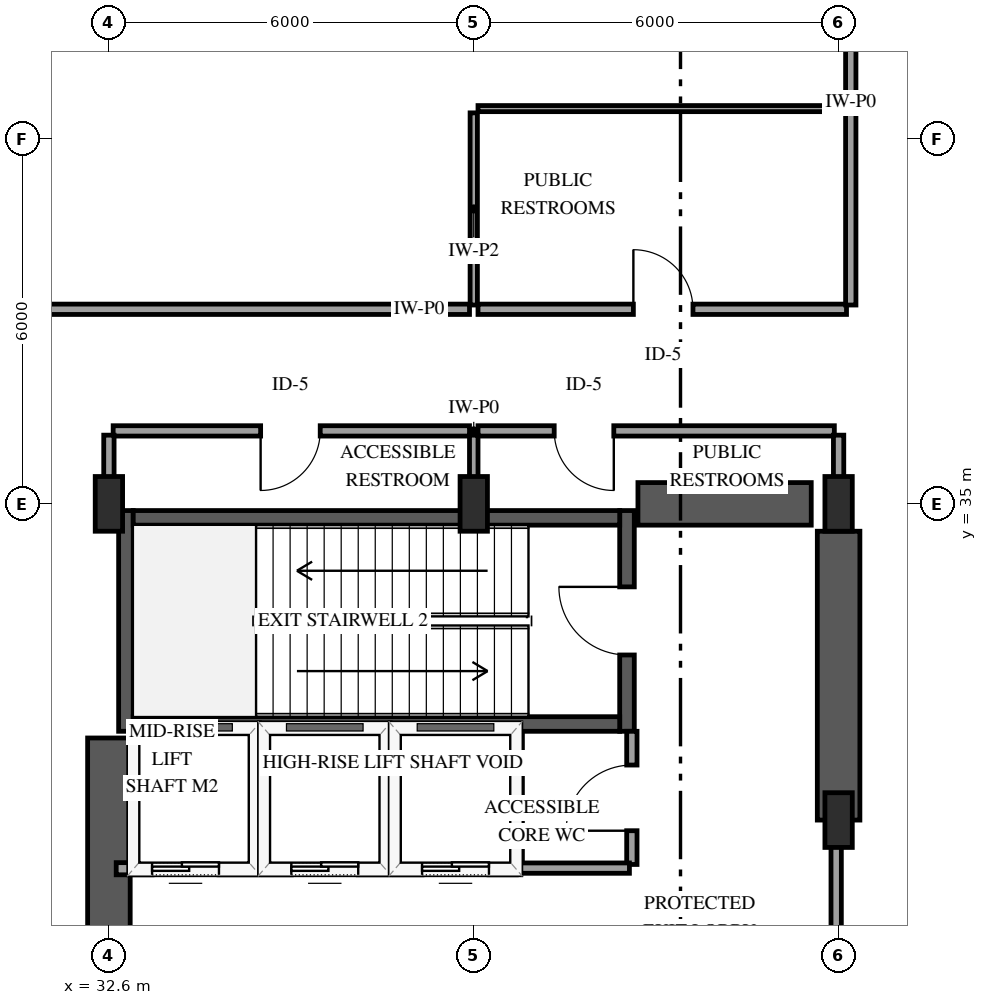
"""IFC4 building model, lengths in metres.
Left out: names, types, materials, properties, quantities, classifications, styles, units other than length and angle.
Written with IfcOpenShell. Run it as: python <this file> out.ifc"""

import sys

from ifc_helpers import new_model, si_unit, direction, frame, frame_2d, origin, origin_2d, place, context, subcontext, project, spatial, rectangle, extrude, element, fill, save


model = new_model("IFC4")
c1 = context("Model", 3, precision=1e-05, world=origin(), true_north=direction((0.0, 1.0)))
c2 = subcontext(c1, "Body", "Model", "MODEL_VIEW")
j1 = project(units=[si_unit("LENGTHUNIT", "METRE"), si_unit("PLANEANGLEUNIT", "RADIAN")], contexts=[c1])
p1 = place(None, origin())
s1 = spatial("IfcSite", under=j1, at=p1, CompositionType="ELEMENT")
p2 = place(p1, origin())
s2 = spatial("IfcBuilding", under=s1, at=p2, CompositionType="ELEMENT")
p3 = place(p2, origin())
s3 = spatial("IfcBuildingStorey", under=s2, at=p3, CompositionType="ELEMENT", Elevation=0.0)
p4 = place(p3, frame((32.88, 31.26, 0.0), z_axis=(0.0, 0.0, 1.0), x_axis=(0.0, 1.0, 0.0)))
e1 = element("IfcWall", 1, at=p4, inside=s3, PredefinedType="SHEAR", context=c2, shape_type="SweptSolid", body=[
    extrude(rectangle(XDim=3.63, YDim=0.24, at=frame_2d((1.815, 0.0))), origin(), (0.0, 0.0, 1.0), 6.0),
])
p5 = place(p3, frame((41.12, 31.26, 0.0), z_axis=(0.0, 0.0, 1.0), x_axis=(0.0, 1.0, 0.0)))
e2 = element("IfcWall", 2, at=p5, inside=s3, PredefinedType="SHEAR", context=c2, shape_type="SweptSolid", body=[
    extrude(rectangle(XDim=3.63, YDim=0.24, at=frame_2d((1.815, 0.0))), origin(), (0.0, 0.0, 1.0), 6.0),
])
p6 = place(p5, frame((1.255, 0.0, 0.0)))
e3 = element("IfcOpeningElement", 3, at=p6, cuts=e2, PredefinedType="OPENING", context=c2, shape_type="SweptSolid", body=[
    extrude(rectangle(XDim=1.12, YDim=2.15, at=frame_2d((0.56, 1.075))), frame((0.0, 0.13, 0.0), z_axis=(0.0, -1.0, 0.0), x_axis=(1.0, 0.0, 0.0)), (0.0, 0.0, 1.0), 0.26),
])
for number, where, z_axis, x_axis in (
    (4, (33.0, 31.38, 0.0), (0.0, 0.0, 1.0), (1.0, 0.0, 0.0)),
    (5, (33.0, 34.77, 0.0), (0.0, 0.0, 1.0), (1.0, 0.0, 0.0)),
):
    element("IfcWall", number, at=place(p3, frame(where, z_axis=z_axis, x_axis=x_axis)), inside=s3, PredefinedType="SHEAR", context=c2, shape_type="SweptSolid", body=[
        extrude(rectangle(XDim=8.0, YDim=0.24, at=frame_2d((4.0, 0.0))), origin(), (0.0, 0.0, 1.0), 6.0),
    ])
p7 = place(p3, frame((32.6, 18.85, 0.0), z_axis=(0.0, 0.0, 1.0), x_axis=(0.0, 1.0, 0.0)))
e6 = element("IfcWall", 6, at=p7, inside=s3, PredefinedType="SHEAR", context=c2, shape_type="SweptSolid", body=[
    extrude(rectangle(XDim=12.3, YDim=0.7, at=frame_2d((6.15, 0.0))), origin(), (0.0, 0.0, 1.0), 6.0),
])
p8 = place(p3, frame((41.3, 35.0, 0.0), z_axis=(0.0, 0.0, 1.0), x_axis=(1.0, 0.0, 0.0)))
e7 = element("IfcWall", 7, at=p8, inside=s3, PredefinedType="SHEAR", context=c2, shape_type="SweptSolid", body=[
    extrude(rectangle(XDim=2.85, YDim=0.7, at=frame_2d((1.425, 0.0))), origin(), (0.0, 0.0, 1.0), 6.0),
])
p9 = place(p3, frame((44.6, 29.8, 0.0), z_axis=(0.0, 0.0, 1.0), x_axis=(0.0, 1.0, 0.0)))
e8 = element("IfcWall", 8, at=p9, inside=s3, PredefinedType="SHEAR", context=c2, shape_type="SweptSolid", body=[
    extrude(rectangle(XDim=4.75, YDim=0.7, at=frame_2d((2.375, 0.0))), origin(), (0.0, 0.0, 1.0), 6.0),
])
for number, where, z_axis, x_axis in (
    (9, (32.6, 35.0, 0.0), (0.0, 0.0, 1.0), (1.0, 0.0, 0.0)),
    (10, (38.6, 35.0, 0.0), (0.0, 0.0, 1.0), (1.0, 0.0, 0.0)),
    (11, (44.6, 29.8, 0.0), (0.0, 0.0, 1.0), (1.0, 0.0, 0.0)),
    (12, (44.6, 35.0, 0.0), (0.0, 0.0, 1.0), (1.0, 0.0, 0.0)),
):
    element("IfcColumn", number, at=place(p3, frame(where, z_axis=z_axis, x_axis=x_axis)), inside=s3, PredefinedType="PILASTER", context=c2, shape_type="SweptSolid", body=[
        extrude(rectangle(XDim=0.45, YDim=0.9, at=origin_2d()), origin(), (0.0, 0.0, 1.0), 6.0),
    ])
p10 = place(p3, frame((32.72, 29.0, 0.0), z_axis=(0.0, 0.0, 1.0), x_axis=(1.0, 0.0, 0.0)))
e13 = element("IfcWall", 13, at=p10, inside=s3, PredefinedType="SOLIDWALL", context=c2, shape_type="SweptSolid", body=[
    extrude(rectangle(XDim=2.28, YDim=0.2, at=frame_2d((1.14, 0.0))), origin(), (0.0, 0.0, 1.0), 5.68),
])
p11 = place(p10, frame((0.59, 0.0, 0.0)))
e14 = element("IfcOpeningElement", 14, at=p11, cuts=e13, PredefinedType="OPENING", context=c2, shape_type="SweptSolid", body=[
    extrude(rectangle(XDim=1.1, YDim=2.15, at=frame_2d((0.55, 1.075))), frame((0.0, 0.11, 0.0), z_axis=(0.0, -1.0, 0.0), x_axis=(1.0, 0.0, 0.0)), (0.0, 0.0, 1.0), 0.22),
])
p12 = place(p3, frame((35.0, 29.11, 0.0), z_axis=(0.0, 0.0, 1.0), x_axis=(0.0, 1.0, 0.0)))
e15 = element("IfcWall", 15, at=p12, inside=s3, PredefinedType="SOLIDWALL", context=c2, shape_type="SweptSolid", body=[
    extrude(rectangle(XDim=2.1, YDim=0.2, at=frame_2d((1.05, 0.0))), origin(), (0.0, 0.0, 1.0), 5.68),
])
p13 = place(p3, frame((35.15, 29.0, 0.0), z_axis=(0.0, 0.0, 1.0), x_axis=(1.0, 0.0, 0.0)))
e16 = element("IfcWall", 16, at=p13, inside=s3, PredefinedType="SOLIDWALL", context=c2, shape_type="SweptSolid", body=[
    extrude(rectangle(XDim=2.0, YDim=0.2, at=frame_2d((1.0, 0.0))), origin(), (0.0, 0.0, 1.0), 5.68),
])
p14 = place(p13, frame((0.45, 0.0, 0.0)))
e17 = element("IfcOpeningElement", 17, at=p14, cuts=e16, PredefinedType="OPENING", context=c2, shape_type="SweptSolid", body=[
    extrude(rectangle(XDim=1.1, YDim=2.15, at=frame_2d((0.55, 1.075))), frame((0.0, 0.11, 0.0), z_axis=(0.0, -1.0, 0.0), x_axis=(1.0, 0.0, 0.0)), (0.0, 0.0, 1.0), 0.22),
])
p15 = place(p3, frame((37.15, 29.11, 0.0), z_axis=(0.0, 0.0, 1.0), x_axis=(0.0, 1.0, 0.0)))
e18 = element("IfcWall", 18, at=p15, inside=s3, PredefinedType="SOLIDWALL", context=c2, shape_type="SweptSolid", body=[
    extrude(rectangle(XDim=2.1, YDim=0.2, at=frame_2d((1.05, 0.0))), origin(), (0.0, 0.0, 1.0), 5.68),
])
p16 = place(p3, frame((37.3, 29.0, 0.0), z_axis=(0.0, 0.0, 1.0), x_axis=(1.0, 0.0, 0.0)))
e19 = element("IfcWall", 19, at=p16, inside=s3, PredefinedType="SOLIDWALL", context=c2, shape_type="SweptSolid", body=[
    extrude(rectangle(XDim=2.0, YDim=0.2, at=frame_2d((1.0, 0.0))), origin(), (0.0, 0.0, 1.0), 5.68),
])
p17 = place(p16, frame((0.45, 0.0, 0.0)))
e20 = element("IfcOpeningElement", 20, at=p17, cuts=e19, PredefinedType="OPENING", context=c2, shape_type="SweptSolid", body=[
    extrude(rectangle(XDim=1.1, YDim=2.15, at=frame_2d((0.55, 1.075))), frame((0.0, 0.11, 0.0), z_axis=(0.0, -1.0, 0.0), x_axis=(1.0, 0.0, 0.0)), (0.0, 0.0, 1.0), 0.22),
])
p18 = place(p3, frame((39.3, 29.11, 0.0), z_axis=(0.0, 0.0, 1.0), x_axis=(0.0, 1.0, 0.0)))
e21 = element("IfcWall", 21, at=p18, inside=s3, PredefinedType="SOLIDWALL", context=c2, shape_type="SweptSolid", body=[
    extrude(rectangle(XDim=2.1, YDim=0.2, at=frame_2d((1.05, 0.0))), origin(), (0.0, 0.0, 1.0), 5.68),
])
p19 = place(p3, frame((30.67, 38.2, 0.0), z_axis=(0.0, 0.0, 1.0), x_axis=(1.0, 0.0, 0.0)))
e22 = element("IfcWall", 22, at=p19, inside=s3, PredefinedType="PARTITIONING", context=c2, shape_type="SweptSolid", body=[
    extrude(rectangle(XDim=7.86, YDim=0.17, at=frame_2d((3.93, 0.0))), origin(), (0.0, 0.0, 1.0), 5.68),
])
p20 = place(p3, frame((44.56, 29.8, 0.0), z_axis=(0.0, 0.0, 1.0), x_axis=(0.0, -1.0, 0.0)))
e23 = element("IfcWall", 23, at=p20, inside=s3, PredefinedType="PARTITIONING", context=c2, shape_type="SweptSolid", body=[
    extrude(rectangle(XDim=6.91, YDim=0.17, at=frame_2d((3.455, 0.0))), origin(), (0.0, 0.0, 1.0), 4.72),
])
p21 = place(p20, frame((2.915, 0.0, 0.0)))
e24 = element("IfcOpeningElement", 24, at=p21, cuts=e23, PredefinedType="OPENING", context=c2, shape_type="SweptSolid", body=[
    extrude(rectangle(XDim=1.38, YDim=2.2, at=frame_2d((0.69, 1.1))), frame((0.0, 0.095, 0.0), z_axis=(0.0, -1.0, 0.0), x_axis=(1.0, 0.0, 0.0)), (0.0, 0.0, 1.0), 0.19),
])
p22 = place(p3, frame((38.67, 38.2, 0.0), z_axis=(0.0, 0.0, 1.0), x_axis=(1.0, 0.0, 0.0)))
e25 = element("IfcWall", 25, at=p22, inside=s3, PredefinedType="PARTITIONING", context=c2, shape_type="SweptSolid", body=[
    extrude(rectangle(XDim=6.06, YDim=0.17, at=frame_2d((3.03, 0.0))), origin(), (0.0, 0.0, 1.0), 5.68),
])
p23 = place(p22, frame((2.555, 0.0, 0.0)))
e26 = element("IfcOpeningElement", 26, at=p23, cuts=e25, PredefinedType="OPENING", context=c2, shape_type="SweptSolid", body=[
    extrude(rectangle(XDim=0.98, YDim=2.15, at=frame_2d((0.49, 1.075))), frame((0.0, 0.095, 0.0), z_axis=(0.0, -1.0, 0.0), x_axis=(1.0, 0.0, 0.0)), (0.0, 0.0, 1.0), 0.19),
])
p24 = place(p3, frame((44.73, 41.5, 0.0), z_axis=(0.0, 0.0, 1.0), x_axis=(-1.0, 0.0, 0.0)))
e27 = element("IfcWall", 27, at=p24, inside=s3, PredefinedType="PARTITIONING", context=c2, shape_type="SweptSolid", body=[
    extrude(rectangle(XDim=6.06, YDim=0.1, at=frame_2d((3.03, 0.0))), origin(), (0.0, 0.0, 1.0), 5.68),
])
p25 = place(p3, frame((38.53, 36.2, 0.0), z_axis=(0.0, 0.0, 1.0), x_axis=(-1.0, 0.0, 0.0)))
e28 = element("IfcWall", 28, at=p25, inside=s3, PredefinedType="PARTITIONING", context=c2, shape_type="SweptSolid", body=[
    extrude(rectangle(XDim=5.86, YDim=0.17, at=frame_2d((2.93, 0.0))), origin(), (0.0, 0.0, 1.0), 5.68),
])
p26 = place(p25, frame((2.455, 0.0, 0.0)))
e29 = element("IfcOpeningElement", 29, at=p26, cuts=e28, PredefinedType="OPENING", context=c2, shape_type="SweptSolid", body=[
    extrude(rectangle(XDim=0.98, YDim=2.15, at=frame_2d((0.49, 1.075))), frame((0.0, 0.095, 0.0), z_axis=(0.0, -1.0, 0.0), x_axis=(1.0, 0.0, 0.0)), (0.0, 0.0, 1.0), 0.19),
])
p27 = place(p3, frame((44.53, 36.2, 0.0), z_axis=(0.0, 0.0, 1.0), x_axis=(-1.0, 0.0, 0.0)))
e30 = element("IfcWall", 30, at=p27, inside=s3, PredefinedType="PARTITIONING", context=c2, shape_type="SweptSolid", body=[
    extrude(rectangle(XDim=5.86, YDim=0.17, at=frame_2d((2.93, 0.0))), origin(), (0.0, 0.0, 1.0), 5.68),
])
p28 = place(p27, frame((3.627, 0.0, 0.0)))
e31 = element("IfcOpeningElement", 31, at=p28, cuts=e30, PredefinedType="OPENING", context=c2, shape_type="SweptSolid", body=[
    extrude(rectangle(XDim=0.98, YDim=2.15, at=frame_2d((0.49, 1.075))), frame((0.0, 0.095, 0.0), z_axis=(0.0, -1.0, 0.0), x_axis=(1.0, 0.0, 0.0)), (0.0, 0.0, 1.0), 0.19),
])
p29 = place(p3, frame((44.8, 41.57, 0.0), z_axis=(0.0, 0.0, 1.0), x_axis=(0.0, 1.0, 0.0)))
e32 = element("IfcWall", 32, at=p29, inside=s3, PredefinedType="PARTITIONING", context=c2, shape_type="SweptSolid", body=[
    extrude(rectangle(XDim=3.36, YDim=0.17, at=frame_2d((1.68, 0.0))), origin(), (0.0, 0.0, 1.0), 4.802),
])
p30 = place(p3, frame((44.8, 38.27, 0.0), z_axis=(0.0, 0.0, 1.0), x_axis=(0.0, 1.0, 0.0)))
e33 = element("IfcWall", 33, at=p30, inside=s3, PredefinedType="PARTITIONING", context=c2, shape_type="SweptSolid", body=[
    extrude(rectangle(XDim=3.16, YDim=0.17, at=frame_2d((1.58, 0.0))), origin(), (0.0, 0.0, 1.0), 4.802),
])
p31 = place(p3, frame((38.6, 41.43, 0.0), z_axis=(0.0, 0.0, 1.0), x_axis=(0.0, -1.0, 0.0)))
e34 = element("IfcWall", 34, at=p31, inside=s3, PredefinedType="PARTITIONING", context=c2, shape_type="SweptSolid", body=[
    extrude(rectangle(XDim=3.16, YDim=0.12, at=frame_2d((1.58, 0.0))), origin(), (0.0, 0.0, 1.0), 5.68),
])
p32 = place(p3, frame((41.2, 29.07, 0.0), z_axis=(0.0, 0.0, 1.0), x_axis=(0.0, 1.0, 0.0)))
e35 = element("IfcWall", 35, at=p32, inside=s3, PredefinedType="PARTITIONING", context=c2, shape_type="SweptSolid", body=[
    extrude(rectangle(XDim=2.19, YDim=0.17, at=frame_2d((1.095, 0.0))), origin(), (0.0, 0.0, 1.0), 5.68),
])
p33 = place(p32, frame((0.555, 0.0, 0.0)))
e36 = element("IfcOpeningElement", 36, at=p33, cuts=e35, PredefinedType="OPENING", context=c2, shape_type="SweptSolid", body=[
    extrude(rectangle(XDim=1.08, YDim=2.15, at=frame_2d((0.54, 1.075))), frame((0.0, 0.095, 0.0), z_axis=(0.0, -1.0, 0.0), x_axis=(1.0, 0.0, 0.0)), (0.0, 0.0, 1.0), 0.19),
])
p34 = place(p3, frame((39.3, 29.01, 0.0), z_axis=(0.0, 0.0, 1.0), x_axis=(1.0, 0.0, 0.0)))
e37 = element("IfcWall", 37, at=p34, inside=s3, PredefinedType="PARTITIONING", context=c2, shape_type="SweptSolid", body=[
    extrude(rectangle(XDim=1.86, YDim=0.17, at=frame_2d((0.93, 0.0))), origin(), (0.0, 0.0, 1.0), 5.68),
])
for number, where, z_axis, x_axis in (
    (38, (32.6, 36.13, 0.0), (0.0, 0.0, 1.0), (0.0, -1.0, 0.0)),
    (39, (44.6, 35.07, 0.0), (0.0, 0.0, 1.0), (0.0, 1.0, 0.0)),
):
    element("IfcWall", number, at=place(p3, frame(where, z_axis=z_axis, x_axis=x_axis)), inside=s3, PredefinedType="PARTITIONING", context=c2, shape_type="SweptSolid", body=[
        extrude(rectangle(XDim=1.06, YDim=0.17, at=frame_2d((0.53, 0.0))), origin(), (0.0, 0.0, 1.0), 4.802),
    ])
p35 = place(p3, frame((38.6, 36.13, 0.0), z_axis=(0.0, 0.0, 1.0), x_axis=(0.0, -1.0, 0.0)))
e40 = element("IfcWall", 40, at=p35, inside=s3, PredefinedType="PARTITIONING", context=c2, shape_type="SweptSolid", body=[
    extrude(rectangle(XDim=1.06, YDim=0.14, at=frame_2d((0.53, 0.0))), origin(), (0.0, 0.0, 1.0), 5.68),
])
p36 = place(p11, origin())
e41 = element("IfcDoor", 41, at=p36, inside=s3, OperationType="SLIDING_TO_LEFT", PredefinedType="DOOR", context=c2, shape_type="SweptSolid", body=[
    extrude(rectangle(XDim=1.1, YDim=2.15, at=frame_2d((0.55, 1.075))), frame((0.0, 0.025, 0.0), z_axis=(0.0, -1.0, 0.0), x_axis=(1.0, 0.0, 0.0)), (0.0, 0.0, 1.0), 0.05),
])
fill(e14, e41)
p37 = place(p14, origin())
e42 = element("IfcDoor", 42, at=p37, inside=s3, OperationType="SLIDING_TO_LEFT", PredefinedType="DOOR", context=c2, shape_type="SweptSolid", body=[
    extrude(rectangle(XDim=1.1, YDim=2.15, at=frame_2d((0.55, 1.075))), frame((0.0, 0.025, 0.0), z_axis=(0.0, -1.0, 0.0), x_axis=(1.0, 0.0, 0.0)), (0.0, 0.0, 1.0), 0.05),
])
fill(e17, e42)
p38 = place(p17, origin())
e43 = element("IfcDoor", 43, at=p38, inside=s3, OperationType="SLIDING_TO_LEFT", PredefinedType="DOOR", context=c2, shape_type="SweptSolid", body=[
    extrude(rectangle(XDim=1.1, YDim=2.15, at=frame_2d((0.55, 1.075))), frame((0.0, 0.025, 0.0), z_axis=(0.0, -1.0, 0.0), x_axis=(1.0, 0.0, 0.0)), (0.0, 0.0, 1.0), 0.05),
])
fill(e20, e43)
p39 = place(p6, origin())
e44 = element("IfcDoor", 44, at=p39, inside=s3, OperationType="SINGLE_SWING_RIGHT", PredefinedType="DOOR", context=c2, shape_type="SweptSolid", body=[
    extrude(rectangle(XDim=1.12, YDim=2.15, at=frame_2d((0.56, 1.075))), frame((0.0, 0.025, 0.0), z_axis=(0.0, -1.0, 0.0), x_axis=(1.0, 0.0, 0.0)), (0.0, 0.0, 1.0), 0.05),
])
fill(e3, e44)
p40 = place(p23, origin())
e45 = element("IfcDoor", 45, at=p40, inside=s3, OperationType="SINGLE_SWING_LEFT", PredefinedType="DOOR", context=c2, shape_type="SweptSolid", body=[
    extrude(rectangle(XDim=0.98, YDim=2.15, at=frame_2d((0.49, 1.075))), frame((0.0, 0.025, 0.0), z_axis=(0.0, -1.0, 0.0), x_axis=(1.0, 0.0, 0.0)), (0.0, 0.0, 1.0), 0.05),
])
fill(e26, e45)
p41 = place(p26, origin())
e46 = element("IfcDoor", 46, at=p41, inside=s3, OperationType="SINGLE_SWING_RIGHT", PredefinedType="DOOR", context=c2, shape_type="SweptSolid", body=[
    extrude(rectangle(XDim=0.98, YDim=2.15, at=frame_2d((0.49, 1.075))), frame((0.0, 0.025, 0.0), z_axis=(0.0, -1.0, 0.0), x_axis=(1.0, 0.0, 0.0)), (0.0, 0.0, 1.0), 0.05),
])
fill(e29, e46)
p42 = place(p28, origin())
e47 = element("IfcDoor", 47, at=p42, inside=s3, OperationType="SINGLE_SWING_LEFT", PredefinedType="DOOR", context=c2, shape_type="SweptSolid", body=[
    extrude(rectangle(XDim=0.98, YDim=2.15, at=frame_2d((0.49, 1.075))), frame((0.0, 0.025, 0.0), z_axis=(0.0, -1.0, 0.0), x_axis=(1.0, 0.0, 0.0)), (0.0, 0.0, 1.0), 0.05),
])
fill(e31, e47)
p43 = place(p33, origin())
e48 = element("IfcDoor", 48, at=p43, inside=s3, OperationType="SINGLE_SWING_LEFT", PredefinedType="DOOR", context=c2, shape_type="SweptSolid", body=[
    extrude(rectangle(XDim=1.08, YDim=2.15, at=frame_2d((0.54, 1.075))), frame((0.0, 0.025, 0.0), z_axis=(0.0, -1.0, 0.0), x_axis=(1.0, 0.0, 0.0)), (0.0, 0.0, 1.0), 0.05),
])
fill(e36, e48)
save(model, sys.argv[1])
